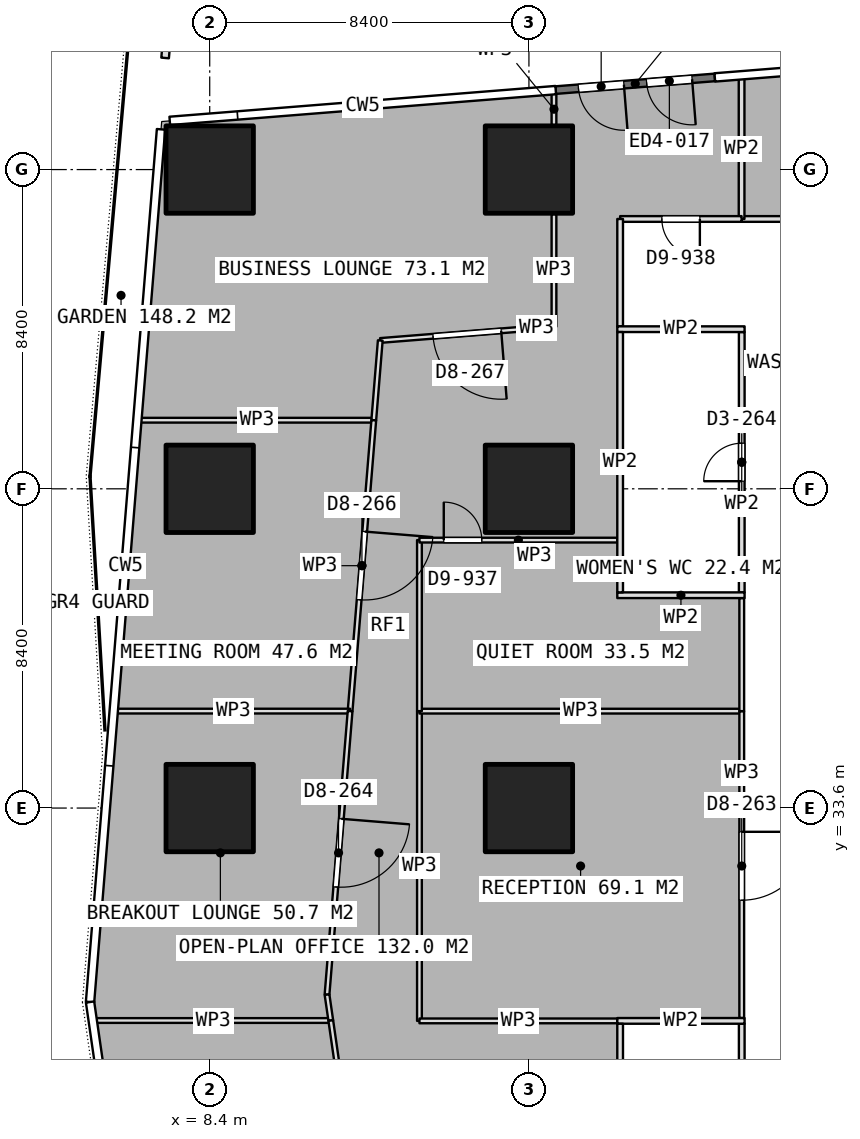
"""IFC4 building model, lengths in metres.
Left out: names, types, materials, properties, quantities, classifications, styles, units other than length and angle.
Written with IfcOpenShell. Run it as: python <this file> out.ifc"""

import sys

from ifc_helpers import new_model, si_unit, direction, frame, frame_2d, origin, origin_2d, place, context, subcontext, project, spatial, rectangle, extrude, element, fill, save


model = new_model("IFC4")
c1 = context("Model", 3, precision=1e-05, world=origin(), true_north=direction((0.0, 1.0)))
c2 = subcontext(c1, "Body", "Model", "MODEL_VIEW")
j1 = project(units=[si_unit("LENGTHUNIT", "METRE"), si_unit("PLANEANGLEUNIT", "RADIAN")], contexts=[c1])
p1 = place(None, origin())
s1 = spatial("IfcSite", under=j1, at=p1, CompositionType="ELEMENT")
p2 = place(p1, origin())
s2 = spatial("IfcBuilding", under=s1, at=p2, CompositionType="ELEMENT")
p3 = place(p2, frame((0.0, 0.0, 245.6)))
s3 = spatial("IfcBuildingStorey", under=s2, at=p3, CompositionType="ELEMENT", Elevation=245.6)
for number, where, z_axis, x_axis in (
    (1, (8.4, 33.6, 0.0), (0.0, 0.0, 1.0), (1.0, 0.0, 0.0)),
    (2, (8.4, 42.0, 0.0), (0.0, 0.0, 1.0), (1.0, 0.0, 0.0)),
    (3, (8.4, 50.4, 0.0), (0.0, 0.0, 1.0), (1.0, 0.0, 0.0)),
    (4, (16.8, 33.6, 0.0), (0.0, 0.0, 1.0), (1.0, 0.0, 0.0)),
    (5, (16.8, 42.0, 0.0), (0.0, 0.0, 1.0), (1.0, 0.0, 0.0)),
    (6, (16.8, 50.4, 0.0), (0.0, 0.0, 1.0), (1.0, 0.0, 0.0)),
):
    element("IfcColumn", number, at=place(p3, frame(where, z_axis=z_axis, x_axis=x_axis)), inside=s3, PredefinedType="COLUMN", context=c2, shape_type="SweptSolid", body=[
        extrude(rectangle(XDim=2.3, YDim=2.3, at=origin_2d()), origin(), (0.0, 0.0, 1.0), 4.5),
    ])
p4 = place(p3, frame((21.691, 52.825, 0.0), z_axis=(0.0, 0.0, 1.0), x_axis=(-0.996837971736, -0.079461047721, 0.0)))
e7 = element("IfcWall", 7, at=p4, inside=s3, PredefinedType="SOLIDWALL", context=c2, shape_type="SweptSolid", body=[
    extrude(rectangle(XDim=4.2, YDim=0.2, at=frame_2d((2.1, 0.0))), origin(), (0.0, 0.0, 1.0), 4.25),
])
p5 = place(p4, frame((0.6, 0.0, 0.0)))
e8 = element("IfcOpeningElement", 8, at=p5, cuts=e7, PredefinedType="OPENING", context=c2, shape_type="SweptSolid", body=[
    extrude(rectangle(XDim=1.2, YDim=2.4, at=frame_2d((0.6, 1.2))), frame((0.0, 0.11, 0.0), z_axis=(0.0, -1.0, 0.0), x_axis=(1.0, 0.0, 0.0)), (0.0, 0.0, 1.0), 0.22),
])
p6 = place(p4, frame((2.4, 0.0, 0.0)))
e9 = element("IfcOpeningElement", 9, at=p6, cuts=e7, PredefinedType="OPENING", context=c2, shape_type="SweptSolid", body=[
    extrude(rectangle(XDim=1.2, YDim=2.4, at=frame_2d((0.6, 1.2))), frame((0.0, 0.11, 0.0), z_axis=(0.0, -1.0, 0.0), x_axis=(1.0, 0.0, 0.0)), (0.0, 0.0, 1.0), 0.22),
])
p7 = place(p3, frame((7.761, 59.397, 0.0), z_axis=(0.0, 0.0, 1.0), x_axis=(-0.087959391808, -0.996124061246, 0.0)))
e10 = element("IfcWall", 10, at=p7, inside=s3, PredefinedType="USERDEFINED", context=c2, shape_type="SweptSolid", body=[
    extrude(rectangle(XDim=6.084, YDim=0.2, at=frame_2d((3.042, 0.0))), origin(), (0.0, 0.0, 1.0), 0.6),
])
for number, where, z_axis, x_axis in (
    (11, (19.125, 39.2, 0.0), (0.0, 0.0, 1.0), (1.0, 0.0, 0.0)),
    (12, (19.125, 46.2, 0.0), (0.0, 0.0, 1.0), (1.0, 0.0, 0.0)),
):
    element("IfcWall", number, at=place(p3, frame(where, z_axis=z_axis, x_axis=x_axis)), inside=s3, PredefinedType="PARTITIONING", context=c2, shape_type="SweptSolid", body=[
        extrude(rectangle(XDim=3.35, YDim=0.15, at=frame_2d((1.675, 0.0))), origin(), (0.0, 0.0, 1.0), 4.25),
    ])
p8 = place(p3, frame((19.2, 39.275, 0.0), z_axis=(0.0, 0.0, 1.0), x_axis=(0.0, 1.0, 0.0)))
e13 = element("IfcWall", 13, at=p8, inside=s3, PredefinedType="PARTITIONING", context=c2, shape_type="SweptSolid", body=[
    extrude(rectangle(XDim=6.85, YDim=0.15, at=frame_2d((3.425, 0.0))), origin(), (0.0, 0.0, 1.0), 4.25),
])
p9 = place(p3, frame((22.4, 39.275, 0.0), z_axis=(0.0, 0.0, 1.0), x_axis=(0.0, 1.0, 0.0)))
e14 = element("IfcWall", 14, at=p9, inside=s3, PredefinedType="PARTITIONING", context=c2, shape_type="SweptSolid", body=[
    extrude(rectangle(XDim=6.85, YDim=0.15, at=frame_2d((3.425, 0.0))), origin(), (0.0, 0.0, 1.0), 4.25),
])
p10 = place(p9, frame((2.925, 0.0, 0.0)))
e15 = element("IfcOpeningElement", 15, at=p10, cuts=e14, PredefinedType="OPENING", context=c2, shape_type="SweptSolid", body=[
    extrude(rectangle(XDim=1.0, YDim=2.1, at=frame_2d((0.5, 1.05))), frame((0.0, 0.085, 0.0), z_axis=(0.0, -1.0, 0.0), x_axis=(1.0, 0.0, 0.0)), (0.0, 0.0, 1.0), 0.17),
])
p11 = place(p3, frame((19.125, 28.0, 0.0), z_axis=(0.0, 0.0, 1.0), x_axis=(1.0, 0.0, 0.0)))
e16 = element("IfcWall", 16, at=p11, inside=s3, PredefinedType="PARTITIONING", context=c2, shape_type="SweptSolid", body=[
    extrude(rectangle(XDim=3.35, YDim=0.15, at=frame_2d((1.675, 0.0))), origin(), (0.0, 0.0, 1.0), 4.25),
])
p12 = place(p3, frame((19.2, 21.075, 0.0), z_axis=(0.0, 0.0, 1.0), x_axis=(0.0, 1.0, 0.0)))
e17 = element("IfcWall", 17, at=p12, inside=s3, PredefinedType="PARTITIONING", context=c2, shape_type="SweptSolid", body=[
    extrude(rectangle(XDim=6.85, YDim=0.15, at=frame_2d((3.425, 0.0))), origin(), (0.0, 0.0, 1.0), 4.25),
])
p13 = place(p3, frame((22.4, 21.075, 0.0), z_axis=(0.0, 0.0, 1.0), x_axis=(0.0, 1.0, 0.0)))
e18 = element("IfcWall", 18, at=p13, inside=s3, PredefinedType="PARTITIONING", context=c2, shape_type="SweptSolid", body=[
    extrude(rectangle(XDim=6.85, YDim=0.15, at=frame_2d((3.425, 0.0))), origin(), (0.0, 0.0, 1.0), 4.25),
])
p14 = place(p13, frame((2.925, 0.0, 0.0)))
e19 = element("IfcOpeningElement", 19, at=p14, cuts=e18, PredefinedType="OPENING", context=c2, shape_type="SweptSolid", body=[
    extrude(rectangle(XDim=1.0, YDim=2.1, at=frame_2d((0.5, 1.05))), frame((0.0, 0.085, 0.0), z_axis=(0.0, -1.0, 0.0), x_axis=(1.0, 0.0, 0.0)), (0.0, 0.0, 1.0), 0.17),
])
p15 = place(p3, frame((12.717, 43.805, 0.0), z_axis=(0.0, 0.0, 1.0), x_axis=(-1.0, 0.0, 0.0)))
e20 = element("IfcWall", 20, at=p15, inside=s3, PredefinedType="PARTITIONING", context=c2, shape_type="SweptSolid", body=[
    extrude(rectangle(XDim=6.14, YDim=0.125, at=frame_2d((3.07, 0.0))), origin(), (0.0, 0.0, 1.0), 4.25),
])
p16 = place(p3, frame((17.459, 52.407, 0.0), z_axis=(0.0, 0.0, 1.0), x_axis=(0.0, -1.0, 0.0)))
e21 = element("IfcWall", 21, at=p16, inside=s3, PredefinedType="PARTITIONING", context=c2, shape_type="SweptSolid", body=[
    extrude(rectangle(XDim=0.837, YDim=0.125, at=frame_2d((0.418, 0.0))), origin(), (0.0, 0.0, 1.0), 4.25),
])
p17 = place(p3, frame((17.459, 49.23, 0.0), z_axis=(0.0, 0.0, 1.0), x_axis=(0.0, -1.0, 0.0)))
e22 = element("IfcWall", 22, at=p17, inside=s3, PredefinedType="PARTITIONING", context=c2, shape_type="SweptSolid", body=[
    extrude(rectangle(XDim=2.962, YDim=0.125, at=frame_2d((1.481, 0.0))), origin(), (0.0, 0.0, 1.0), 4.25),
])
p18 = place(p3, frame((17.459, 46.268, 0.0), z_axis=(0.0, 0.0, 1.0), x_axis=(-0.996827286597, -0.079594979088, 0.0)))
e23 = element("IfcWall", 23, at=p18, inside=s3, PredefinedType="PARTITIONING", context=c2, shape_type="SweptSolid", body=[
    extrude(rectangle(XDim=4.586, YDim=0.125, at=frame_2d((2.293, 0.0))), origin(), (0.0, 0.0, 1.0), 4.25),
])
p19 = place(p18, frame((1.393, 0.0, 0.0)))
e24 = element("IfcOpeningElement", 24, at=p19, cuts=e23, PredefinedType="OPENING", context=c2, shape_type="SweptSolid", body=[
    extrude(rectangle(XDim=1.8, YDim=2.1, at=frame_2d((0.9, 1.05))), frame((0.0, 0.073, 0.0), z_axis=(0.0, -1.0, 0.0), x_axis=(1.0, 0.0, 0.0)), (0.0, 0.0, 1.0), 0.145),
])
p20 = place(p3, frame((12.888, 45.903, 0.0), z_axis=(0.0, 0.0, 1.0), x_axis=(-0.081183317519, -0.996699186794, 0.0)))
e25 = element("IfcWall", 25, at=p20, inside=s3, PredefinedType="PARTITIONING", context=c2, shape_type="SweptSolid", body=[
    extrude(rectangle(XDim=2.105, YDim=0.125, at=frame_2d((1.052, 0.0))), origin(), (0.0, 0.0, 1.0), 4.25),
])
p21 = place(p3, frame((12.717, 43.804, 0.0), z_axis=(0.0, 0.0, 1.0), x_axis=(-0.081142844152, -0.996702482611, 0.0)))
e26 = element("IfcWall", 26, at=p21, inside=s3, PredefinedType="PARTITIONING", context=c2, shape_type="SweptSolid", body=[
    extrude(rectangle(XDim=7.678, YDim=0.125, at=frame_2d((3.839, 0.0))), origin(), (0.0, 0.0, 1.0), 4.25),
])
p22 = place(p21, frame((2.939, 0.0, 0.0)))
e27 = element("IfcOpeningElement", 27, at=p22, cuts=e26, PredefinedType="OPENING", context=c2, shape_type="SweptSolid", body=[
    extrude(rectangle(XDim=1.8, YDim=2.1, at=frame_2d((0.9, 1.05))), frame((0.0, 0.073, 0.0), z_axis=(0.0, -1.0, 0.0), x_axis=(1.0, 0.0, 0.0)), (0.0, 0.0, 1.0), 0.145),
])
p23 = place(p3, frame((12.094, 36.151, 0.0), z_axis=(0.0, 0.0, 1.0), x_axis=(-1.0, 0.0, 0.0)))
e28 = element("IfcWall", 28, at=p23, inside=s3, PredefinedType="PARTITIONING", context=c2, shape_type="SweptSolid", body=[
    extrude(rectangle(XDim=6.14, YDim=0.125, at=frame_2d((3.07, 0.0))), origin(), (0.0, 0.0, 1.0), 4.25),
])
p24 = place(p3, frame((11.586, 28.01, 0.0), z_axis=(0.0, 0.0, 1.0), x_axis=(-1.0, 0.0, 0.0)))
e29 = element("IfcWall", 29, at=p24, inside=s3, PredefinedType="PARTITIONING", context=c2, shape_type="SweptSolid", body=[
    extrude(rectangle(XDim=6.184, YDim=0.125, at=frame_2d((3.092, 0.0))), origin(), (0.0, 0.0, 1.0), 4.25),
])
p25 = place(p3, frame((12.094, 36.15, 0.0), z_axis=(0.0, 0.0, 1.0), x_axis=(-0.081101425513, -0.99670585369, 0.0)))
e30 = element("IfcWall", 30, at=p25, inside=s3, PredefinedType="PARTITIONING", context=c2, shape_type="SweptSolid", body=[
    extrude(rectangle(XDim=7.484, YDim=0.125, at=frame_2d((3.742, 0.0))), origin(), (0.0, 0.0, 1.0), 4.25),
])
p26 = place(p25, frame((2.842, 0.0, 0.0)))
e31 = element("IfcOpeningElement", 31, at=p26, cuts=e30, PredefinedType="OPENING", context=c2, shape_type="SweptSolid", body=[
    extrude(rectangle(XDim=1.8, YDim=2.1, at=frame_2d((0.9, 1.05))), frame((0.0, 0.073, 0.0), z_axis=(0.0, -1.0, 0.0), x_axis=(1.0, 0.0, 0.0)), (0.0, 0.0, 1.0), 0.145),
])
p27 = place(p3, frame((11.487, 28.691, 0.0), z_axis=(0.0, 0.0, 1.0), x_axis=(0.143706083616, -0.989620412851, 0.0)))
e32 = element("IfcWall", 32, at=p27, inside=s3, PredefinedType="PARTITIONING", context=c2, shape_type="SweptSolid", body=[
    extrude(rectangle(XDim=0.688, YDim=0.125, at=frame_2d((0.344, 0.0))), origin(), (0.0, 0.0, 1.0), 4.25),
])
p28 = place(p3, frame((11.586, 28.009, 0.0), z_axis=(0.0, 0.0, 1.0), x_axis=(0.143043957939, -0.989716336178, 0.0)))
e33 = element("IfcWall", 33, at=p28, inside=s3, PredefinedType="PARTITIONING", context=c2, shape_type="SweptSolid", body=[
    extrude(rectangle(XDim=6.803, YDim=0.125, at=frame_2d((3.402, 0.0))), origin(), (0.0, 0.0, 1.0), 4.25),
])
p29 = place(p28, frame((2.901, 0.0, 0.0)))
e34 = element("IfcOpeningElement", 34, at=p29, cuts=e33, PredefinedType="OPENING", context=c2, shape_type="SweptSolid", body=[
    extrude(rectangle(XDim=1.0, YDim=2.1, at=frame_2d((0.5, 1.05))), frame((0.0, 0.073, 0.0), z_axis=(0.0, -1.0, 0.0), x_axis=(1.0, 0.0, 0.0)), (0.0, 0.0, 1.0), 0.145),
])
p30 = place(p3, frame((13.919, 28.0, 0.0), z_axis=(0.0, 0.0, 1.0), x_axis=(0.0, 1.0, 0.0)))
e35 = element("IfcWall", 35, at=p30, inside=s3, PredefinedType="PARTITIONING", context=c2, shape_type="SweptSolid", body=[
    extrude(rectangle(XDim=8.15, YDim=0.125, at=frame_2d((4.075, 0.0))), origin(), (0.0, 0.0, 1.0), 4.25),
])
p31 = place(p3, frame((13.919, 36.15, 0.0), z_axis=(0.0, 0.0, 1.0), x_axis=(1.0, 0.0, 0.0)))
e36 = element("IfcWall", 36, at=p31, inside=s3, PredefinedType="PARTITIONING", context=c2, shape_type="SweptSolid", body=[
    extrude(rectangle(XDim=8.481, YDim=0.125, at=frame_2d((4.24, 0.0))), origin(), (0.0, 0.0, 1.0), 4.25),
])
p32 = place(p3, frame((22.4, 36.15, 0.0), z_axis=(0.0, 0.0, 1.0), x_axis=(0.0, -1.0, 0.0)))
e37 = element("IfcWall", 37, at=p32, inside=s3, PredefinedType="PARTITIONING", context=c2, shape_type="SweptSolid", body=[
    extrude(rectangle(XDim=8.075, YDim=0.125, at=frame_2d((4.038, 0.0))), origin(), (0.0, 0.0, 1.0), 4.25),
])
p33 = place(p32, frame((3.175, 0.0, 0.0)))
e38 = element("IfcOpeningElement", 38, at=p33, cuts=e37, PredefinedType="OPENING", context=c2, shape_type="SweptSolid", body=[
    extrude(rectangle(XDim=1.8, YDim=2.1, at=frame_2d((0.9, 1.05))), frame((0.0, 0.073, 0.0), z_axis=(0.0, -1.0, 0.0), x_axis=(1.0, 0.0, 0.0)), (0.0, 0.0, 1.0), 0.145),
])
p34 = place(p3, frame((19.125, 28.0, 0.0), z_axis=(0.0, 0.0, 1.0), x_axis=(-1.0, 0.0, 0.0)))
e39 = element("IfcWall", 39, at=p34, inside=s3, PredefinedType="PARTITIONING", context=c2, shape_type="SweptSolid", body=[
    extrude(rectangle(XDim=5.206, YDim=0.125, at=frame_2d((2.603, 0.0))), origin(), (0.0, 0.0, 1.0), 4.25),
])
p35 = place(p3, frame((22.4, 39.125, 0.0), z_axis=(0.0, 0.0, 1.0), x_axis=(0.0, -1.0, 0.0)))
e40 = element("IfcWall", 40, at=p35, inside=s3, PredefinedType="PARTITIONING", context=c2, shape_type="SweptSolid", body=[
    extrude(rectangle(XDim=2.975, YDim=0.125, at=frame_2d((1.488, 0.0))), origin(), (0.0, 0.0, 1.0), 4.25),
])
p36 = place(p3, frame((13.919, 36.15, 0.0), z_axis=(0.0, 0.0, 1.0), x_axis=(0.0, 1.0, 0.0)))
e41 = element("IfcWall", 41, at=p36, inside=s3, PredefinedType="PARTITIONING", context=c2, shape_type="SweptSolid", body=[
    extrude(rectangle(XDim=4.5, YDim=0.125, at=frame_2d((2.25, 0.0))), origin(), (0.0, 0.0, 1.0), 4.25),
])
p37 = place(p3, frame((13.919, 40.65, 0.0), z_axis=(0.0, 0.0, 1.0), x_axis=(1.0, 0.0, 0.0)))
e42 = element("IfcWall", 42, at=p37, inside=s3, PredefinedType="PARTITIONING", context=c2, shape_type="SweptSolid", body=[
    extrude(rectangle(XDim=5.206, YDim=0.125, at=frame_2d((2.603, 0.0))), origin(), (0.0, 0.0, 1.0), 4.25),
])
p38 = place(p37, frame((0.64, 0.0, 0.0)))
e43 = element("IfcOpeningElement", 43, at=p38, cuts=e42, PredefinedType="OPENING", context=c2, shape_type="SweptSolid", body=[
    extrude(rectangle(XDim=1.0, YDim=2.1, at=frame_2d((0.5, 1.05))), frame((0.0, 0.073, 0.0), z_axis=(0.0, -1.0, 0.0), x_axis=(1.0, 0.0, 0.0)), (0.0, 0.0, 1.0), 0.145),
])
p39 = place(p3, frame((42.93, 49.1, 0.0), z_axis=(0.0, 0.0, 1.0), x_axis=(-1.0, 0.0, 0.0)))
e44 = element("IfcWall", 44, at=p39, inside=s3, PredefinedType="PARTITIONING", context=c2, shape_type="SweptSolid", body=[
    extrude(rectangle(XDim=20.534, YDim=0.15, at=frame_2d((10.267, 0.0))), origin(), (0.0, 0.0, 1.0), 4.25),
])
p40 = place(p39, frame((10.567, 0.0, 0.0)))
e45 = element("IfcOpeningElement", 45, at=p40, cuts=e44, PredefinedType="OPENING", context=c2, shape_type="SweptSolid", body=[
    extrude(rectangle(XDim=1.0, YDim=2.1, at=frame_2d((0.5, 1.05))), frame((0.0, 0.085, 0.0), z_axis=(0.0, -1.0, 0.0), x_axis=(1.0, 0.0, 0.0)), (0.0, 0.0, 1.0), 0.17),
])
p41 = place(p3, frame((22.396, 49.1, 0.0), z_axis=(0.0, 0.0, 1.0), x_axis=(0.0, 1.0, 0.0)))
e46 = element("IfcWall", 46, at=p41, inside=s3, PredefinedType="PARTITIONING", context=c2, shape_type="SweptSolid", body=[
    extrude(rectangle(XDim=3.701, YDim=0.15, at=frame_2d((1.851, 0.0))), origin(), (0.0, 0.0, 1.0), 4.25),
])
p42 = place(p3, frame((22.396, 49.1, 0.0), z_axis=(0.0, 0.0, 1.0), x_axis=(-1.0, 0.0, 0.0)))
e47 = element("IfcWall", 47, at=p42, inside=s3, PredefinedType="PARTITIONING", context=c2, shape_type="SweptSolid", body=[
    extrude(rectangle(XDim=3.196, YDim=0.15, at=frame_2d((1.598, 0.0))), origin(), (0.0, 0.0, 1.0), 4.25),
])
p43 = place(p42, frame((1.098, 0.0, 0.0)))
e48 = element("IfcOpeningElement", 48, at=p43, cuts=e47, PredefinedType="OPENING", context=c2, shape_type="SweptSolid", body=[
    extrude(rectangle(XDim=1.0, YDim=2.1, at=frame_2d((0.5, 1.05))), frame((0.0, 0.085, 0.0), z_axis=(0.0, -1.0, 0.0), x_axis=(1.0, 0.0, 0.0)), (0.0, 0.0, 1.0), 0.17),
])
p44 = place(p3, frame((19.2, 49.1, 0.0), z_axis=(0.0, 0.0, 1.0), x_axis=(0.0, -1.0, 0.0)))
e49 = element("IfcWall", 49, at=p44, inside=s3, PredefinedType="PARTITIONING", context=c2, shape_type="SweptSolid", body=[
    extrude(rectangle(XDim=2.825, YDim=0.15, at=frame_2d((1.413, 0.0))), origin(), (0.0, 0.0, 1.0), 4.25),
])
p45 = place(p5, origin())
e50 = element("IfcDoor", 50, at=p45, inside=s3, OperationType="SINGLE_SWING_LEFT", PredefinedType="DOOR", context=c2, shape_type="SweptSolid", body=[
    extrude(rectangle(XDim=1.2, YDim=2.4, at=frame_2d((0.6, 1.2))), frame((0.0, 0.025, 0.0), z_axis=(0.0, -1.0, 0.0), x_axis=(1.0, 0.0, 0.0)), (0.0, 0.0, 1.0), 0.05),
])
fill(e8, e50)
p46 = place(p6, origin())
e51 = element("IfcDoor", 51, at=p46, inside=s3, OperationType="SINGLE_SWING_LEFT", PredefinedType="DOOR", context=c2, shape_type="SweptSolid", body=[
    extrude(rectangle(XDim=1.2, YDim=2.4, at=frame_2d((0.6, 1.2))), frame((0.0, 0.025, 0.0), z_axis=(0.0, -1.0, 0.0), x_axis=(1.0, 0.0, 0.0)), (0.0, 0.0, 1.0), 0.05),
])
fill(e9, e51)
p47 = place(p10, origin())
e52 = element("IfcDoor", 52, at=p47, inside=s3, OperationType="SINGLE_SWING_LEFT", PredefinedType="DOOR", context=c2, shape_type="SweptSolid", body=[
    extrude(rectangle(XDim=1.0, YDim=2.1, at=frame_2d((0.5, 1.05))), frame((0.0, 0.025, 0.0), z_axis=(0.0, -1.0, 0.0), x_axis=(1.0, 0.0, 0.0)), (0.0, 0.0, 1.0), 0.05),
])
fill(e15, e52)
p48 = place(p19, origin())
e53 = element("IfcDoor", 53, at=p48, inside=s3, OperationType="DOUBLE_DOOR_SINGLE_SWING", PredefinedType="DOOR", context=c2, shape_type="SweptSolid", body=[
    extrude(rectangle(XDim=1.8, YDim=2.1, at=frame_2d((0.9, 1.05))), frame((0.0, 0.025, 0.0), z_axis=(0.0, -1.0, 0.0), x_axis=(1.0, 0.0, 0.0)), (0.0, 0.0, 1.0), 0.05),
])
fill(e24, e53)
p49 = place(p22, origin())
e54 = element("IfcDoor", 54, at=p49, inside=s3, OperationType="DOUBLE_DOOR_SINGLE_SWING", PredefinedType="DOOR", context=c2, shape_type="SweptSolid", body=[
    extrude(rectangle(XDim=1.8, YDim=2.1, at=frame_2d((0.9, 1.05))), frame((0.0, 0.025, 0.0), z_axis=(0.0, -1.0, 0.0), x_axis=(1.0, 0.0, 0.0)), (0.0, 0.0, 1.0), 0.05),
])
fill(e27, e54)
p50 = place(p26, origin())
e55 = element("IfcDoor", 55, at=p50, inside=s3, OperationType="DOUBLE_DOOR_SINGLE_SWING", PredefinedType="DOOR", context=c2, shape_type="SweptSolid", body=[
    extrude(rectangle(XDim=1.8, YDim=2.1, at=frame_2d((0.9, 1.05))), frame((0.0, 0.025, 0.0), z_axis=(0.0, -1.0, 0.0), x_axis=(1.0, 0.0, 0.0)), (0.0, 0.0, 1.0), 0.05),
])
fill(e31, e55)
p51 = place(p33, origin())
e56 = element("IfcDoor", 56, at=p51, inside=s3, OperationType="DOUBLE_DOOR_SINGLE_SWING", PredefinedType="DOOR", context=c2, shape_type="SweptSolid", body=[
    extrude(rectangle(XDim=1.8, YDim=2.1, at=frame_2d((0.9, 1.05))), frame((0.0, 0.025, 0.0), z_axis=(0.0, -1.0, 0.0), x_axis=(1.0, 0.0, 0.0)), (0.0, 0.0, 1.0), 0.05),
])
fill(e38, e56)
p52 = place(p38, origin())
e57 = element("IfcDoor", 57, at=p52, inside=s3, OperationType="SINGLE_SWING_LEFT", PredefinedType="DOOR", context=c2, shape_type="SweptSolid", body=[
    extrude(rectangle(XDim=1.0, YDim=2.1, at=frame_2d((0.5, 1.05))), frame((0.0, 0.025, 0.0), z_axis=(0.0, -1.0, 0.0), x_axis=(1.0, 0.0, 0.0)), (0.0, 0.0, 1.0), 0.05),
])
fill(e43, e57)
p53 = place(p43, origin())
e58 = element("IfcDoor", 58, at=p53, inside=s3, OperationType="SINGLE_SWING_LEFT", PredefinedType="DOOR", context=c2, shape_type="SweptSolid", body=[
    extrude(rectangle(XDim=1.0, YDim=2.1, at=frame_2d((0.5, 1.05))), frame((0.0, 0.025, 0.0), z_axis=(0.0, -1.0, 0.0), x_axis=(1.0, 0.0, 0.0)), (0.0, 0.0, 1.0), 0.05),
])
fill(e48, e58)
save(model, sys.argv[1])
